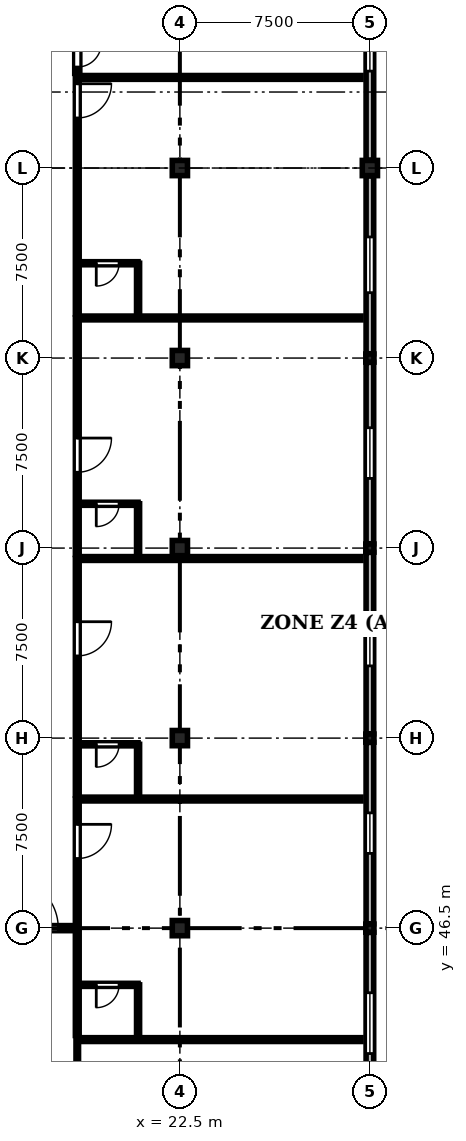
"""IFC4 building model, lengths in metres.
Left out: names, types, materials, properties, quantities, classifications, styles, units other than length and angle.
Written with IfcOpenShell. Run it as: python <this file> out.ifc"""

import sys

from ifc_helpers import new_model, si_unit, direction, frame, frame_2d, origin, origin_2d, place, context, subcontext, project, spatial, rectangle, circle, extrude, element, fill, save


model = new_model("IFC4")
c1 = context("Model", 3, precision=1e-05, world=origin(), true_north=direction((0.0, 1.0)))
c2 = subcontext(c1, "Body", "Model", "MODEL_VIEW")
j1 = project(units=[si_unit("LENGTHUNIT", "METRE"), si_unit("PLANEANGLEUNIT", "RADIAN")], contexts=[c1])
p1 = place(None, origin())
s1 = spatial("IfcSite", under=j1, at=p1, CompositionType="ELEMENT")
p2 = place(p1, origin())
s2 = spatial("IfcBuilding", under=s1, at=p2, CompositionType="ELEMENT")
p3 = place(p2, frame((0.0, 0.0, 21.9)))
s3 = spatial("IfcBuildingStorey", under=s2, at=p3, CompositionType="ELEMENT", Elevation=21.9)
p4 = place(p3, frame((22.5, 46.5, 0.0), z_axis=(0.0, 0.0, 1.0), x_axis=(1.0, 0.0, 0.0)))
e1 = element("IfcColumn", 1, at=p4, inside=s3, PredefinedType="COLUMN", context=c2, shape_type="SweptSolid", body=[
    extrude(circle(Radius=0.3, at=origin_2d()), origin(), (0.0, 0.0, 1.0), 4.05),
])
for number, where, z_axis, x_axis in (
    (2, (22.5, 54.0, 0.0), (0.0, 0.0, 1.0), (1.0, 0.0, 0.0)),
    (3, (22.5, 61.5, 0.0), (0.0, 0.0, 1.0), (1.0, 0.0, 0.0)),
):
    element("IfcColumn", number, at=place(p3, frame(where, z_axis=z_axis, x_axis=x_axis)), inside=s3, PredefinedType="COLUMN", context=c2, shape_type="SweptSolid", body=[
        extrude(rectangle(XDim=0.6, YDim=0.6, at=origin_2d()), origin(), (0.0, 0.0, 1.0), 4.05),
    ])
p5 = place(p3, frame((22.5, 69.0, 0.0), z_axis=(0.0, 0.0, 1.0), x_axis=(1.0, 0.0, 0.0)))
e4 = element("IfcColumn", 4, at=p5, inside=s3, PredefinedType="COLUMN", context=c2, shape_type="SweptSolid", body=[
    extrude(circle(Radius=0.3, at=origin_2d()), origin(), (0.0, 0.0, 1.0), 4.05),
])
p6 = place(p3, frame((22.5, 76.5, 0.0), z_axis=(0.0, 0.0, 1.0), x_axis=(1.0, 0.0, 0.0)))
e5 = element("IfcColumn", 5, at=p6, inside=s3, PredefinedType="COLUMN", context=c2, shape_type="SweptSolid", body=[
    extrude(rectangle(XDim=0.6, YDim=0.6, at=origin_2d()), origin(), (0.0, 0.0, 1.0), 4.05),
])
for number, where, z_axis, x_axis in (
    (6, (30.0, 46.5, 0.0), (0.0, 0.0, 1.0), (1.0, 0.0, 0.0)),
    (7, (30.0, 54.0, 0.0), (0.0, 0.0, 1.0), (1.0, 0.0, 0.0)),
    (8, (30.0, 61.5, 0.0), (0.0, 0.0, 1.0), (1.0, 0.0, 0.0)),
    (9, (30.0, 69.0, 0.0), (0.0, 0.0, 1.0), (1.0, 0.0, 0.0)),
):
    element("IfcColumn", number, at=place(p3, frame(where, z_axis=z_axis, x_axis=x_axis)), inside=s3, PredefinedType="COLUMN", context=c2, shape_type="SweptSolid", body=[
        extrude(rectangle(XDim=0.32, YDim=0.32, at=origin_2d()), origin(), (0.0, 0.0, 1.0), 4.05),
    ])
p7 = place(p3, frame((30.0, 76.5, 0.0), z_axis=(0.0, 0.0, 1.0), x_axis=(1.0, 0.0, 0.0)))
e10 = element("IfcColumn", 10, at=p7, inside=s3, PredefinedType="COLUMN", context=c2, shape_type="SweptSolid", body=[
    extrude(rectangle(XDim=0.6, YDim=0.6, at=origin_2d()), origin(), (0.0, 0.0, 1.0), 4.05),
])
p8 = place(p3, frame((30.0, 46.33, 0.0), z_axis=(0.0, 0.0, 1.0), x_axis=(0.0, -1.0, 0.0)))
e11 = element("IfcWall", 11, at=p8, inside=s3, PredefinedType="STANDARD", context=c2, shape_type="SweptSolid", body=[
    extrude(rectangle(XDim=7.16, YDim=0.3, at=frame_2d((3.58, 0.0))), origin(), (0.0, 0.0, 1.0), 3.17),
])
p9 = place(p8, frame((2.38, 0.0, 0.9)))
e12 = element("IfcOpeningElement", 12, at=p9, cuts=e11, PredefinedType="OPENING", context=c2, shape_type="SweptSolid", body=[
    extrude(rectangle(XDim=2.4, YDim=1.99, at=frame_2d((1.2, 0.995))), frame((0.0, 0.16, 0.0), z_axis=(0.0, -1.0, 0.0), x_axis=(1.0, 0.0, 0.0)), (0.0, 0.0, 1.0), 0.32),
])
p10 = place(p3, frame((30.0, 53.83, 0.0), z_axis=(0.0, 0.0, 1.0), x_axis=(0.0, -1.0, 0.0)))
e13 = element("IfcWall", 13, at=p10, inside=s3, PredefinedType="STANDARD", context=c2, shape_type="SweptSolid", body=[
    extrude(rectangle(XDim=7.16, YDim=0.3, at=frame_2d((3.58, 0.0))), origin(), (0.0, 0.0, 1.0), 3.17),
])
p11 = place(p10, frame((2.78, 0.0, 0.9)))
e14 = element("IfcOpeningElement", 14, at=p11, cuts=e13, PredefinedType="OPENING", context=c2, shape_type="SweptSolid", body=[
    extrude(rectangle(XDim=1.6, YDim=1.95, at=frame_2d((0.8, 0.975))), frame((0.0, 0.16, 0.0), z_axis=(0.0, -1.0, 0.0), x_axis=(1.0, 0.0, 0.0)), (0.0, 0.0, 1.0), 0.32),
])
p12 = place(p3, frame((30.0, 61.33, 0.0), z_axis=(0.0, 0.0, 1.0), x_axis=(0.0, -1.0, 0.0)))
e15 = element("IfcWall", 15, at=p12, inside=s3, PredefinedType="STANDARD", context=c2, shape_type="SweptSolid", body=[
    extrude(rectangle(XDim=7.16, YDim=0.3, at=frame_2d((3.58, 0.0))), origin(), (0.0, 0.0, 1.0), 3.17),
])
p13 = place(p12, frame((2.68, 0.0, 0.9)))
e16 = element("IfcOpeningElement", 16, at=p13, cuts=e15, PredefinedType="OPENING", context=c2, shape_type="SweptSolid", body=[
    extrude(rectangle(XDim=1.8, YDim=1.95, at=frame_2d((0.9, 0.975))), frame((0.0, 0.16, 0.0), z_axis=(0.0, -1.0, 0.0), x_axis=(1.0, 0.0, 0.0)), (0.0, 0.0, 1.0), 0.32),
])
p14 = place(p3, frame((30.0, 68.83, 0.0), z_axis=(0.0, 0.0, 1.0), x_axis=(0.0, -1.0, 0.0)))
e17 = element("IfcWall", 17, at=p14, inside=s3, PredefinedType="STANDARD", context=c2, shape_type="SweptSolid", body=[
    extrude(rectangle(XDim=7.16, YDim=0.3, at=frame_2d((3.58, 0.0))), origin(), (0.0, 0.0, 1.0), 3.17),
])
p15 = place(p14, frame((2.58, 0.0, 0.9)))
e18 = element("IfcOpeningElement", 18, at=p15, cuts=e17, PredefinedType="OPENING", context=c2, shape_type="SweptSolid", body=[
    extrude(rectangle(XDim=2.0, YDim=1.95, at=frame_2d((1.0, 0.975))), frame((0.0, 0.16, 0.0), z_axis=(0.0, -1.0, 0.0), x_axis=(1.0, 0.0, 0.0)), (0.0, 0.0, 1.0), 0.32),
])
p16 = place(p3, frame((30.0, 76.19, 0.0), z_axis=(0.0, 0.0, 1.0), x_axis=(0.0, -1.0, 0.0)))
e19 = element("IfcWall", 19, at=p16, inside=s3, PredefinedType="STANDARD", context=c2, shape_type="SweptSolid", body=[
    extrude(rectangle(XDim=7.02, YDim=0.3, at=frame_2d((3.51, 0.0))), origin(), (0.0, 0.0, 1.0), 3.17),
])
p17 = place(p16, frame((2.41, 0.0, 0.9)))
e20 = element("IfcOpeningElement", 20, at=p17, cuts=e19, PredefinedType="OPENING", context=c2, shape_type="SweptSolid", body=[
    extrude(rectangle(XDim=2.2, YDim=1.95, at=frame_2d((1.1, 0.975))), frame((0.0, 0.16, 0.0), z_axis=(0.0, -1.0, 0.0), x_axis=(1.0, 0.0, 0.0)), (0.0, 0.0, 1.0), 0.32),
])
p18 = place(p3, frame((30.0, 85.24, 0.0), z_axis=(0.0, 0.0, 1.0), x_axis=(0.0, -1.0, 0.0)))
e21 = element("IfcWall", 21, at=p18, inside=s3, PredefinedType="STANDARD", context=c2, shape_type="SweptSolid", body=[
    extrude(rectangle(XDim=8.43, YDim=0.3, at=frame_2d((4.215, 0.0))), origin(), (0.0, 0.0, 1.0), 3.22),
])
p19 = place(p18, frame((3.515, 0.0, 0.9)))
e22 = element("IfcOpeningElement", 22, at=p19, cuts=e21, PredefinedType="OPENING", context=c2, shape_type="SweptSolid", body=[
    extrude(rectangle(XDim=1.4, YDim=1.8, at=frame_2d((0.7, 0.9))), frame((0.0, 0.16, 0.0), z_axis=(0.0, -1.0, 0.0), x_axis=(1.0, 0.0, 0.0)), (0.0, 0.0, 1.0), 0.32),
])
p20 = place(p3, frame((18.45, 42.101, 0.0), z_axis=(0.0, 0.0, 1.0), x_axis=(0.0, -1.0, 0.0)))
e23 = element("IfcWall", 23, at=p20, inside=s3, PredefinedType="PARTITIONING", context=c2, shape_type="SweptSolid", body=[
    extrude(rectangle(XDim=9.334, YDim=0.1, at=frame_2d((4.667, 0.0))), origin(), (0.0, 0.0, 1.0), 3.755),
])
p21 = place(p20, frame((6.477, 0.0, 0.0)))
e24 = element("IfcOpeningElement", 24, at=p21, cuts=e23, PredefinedType="OPENING", context=c2, shape_type="SweptSolid", body=[
    extrude(rectangle(XDim=1.05, YDim=2.2, at=frame_2d((0.525, 1.1))), frame((0.0, 0.06, 0.0), z_axis=(0.0, -1.0, 0.0), x_axis=(1.0, 0.0, 0.0)), (0.0, 0.0, 1.0), 0.12),
])
p22 = place(p3, frame((18.45, 51.595, 0.0), z_axis=(0.0, 0.0, 1.0), x_axis=(0.0, -1.0, 0.0)))
e25 = element("IfcWall", 25, at=p22, inside=s3, PredefinedType="PARTITIONING", context=c2, shape_type="SweptSolid", body=[
    extrude(rectangle(XDim=9.334, YDim=0.15, at=frame_2d((4.667, 0.0))), origin(), (0.0, 0.0, 1.0), 3.755),
])
p23 = place(p22, frame((0.998, 0.0, 0.0)))
e26 = element("IfcOpeningElement", 26, at=p23, cuts=e25, PredefinedType="OPENING", context=c2, shape_type="SweptSolid", body=[
    extrude(rectangle(XDim=1.35, YDim=2.25, at=frame_2d((0.675, 1.125))), frame((0.0, 0.085, 0.0), z_axis=(0.0, -1.0, 0.0), x_axis=(1.0, 0.0, 0.0)), (0.0, 0.0, 1.0), 0.17),
])
p24 = place(p3, frame((20.85, 44.261, 0.0), z_axis=(0.0, 0.0, 1.0), x_axis=(-1.0, 0.0, 0.0)))
e27 = element("IfcWall", 27, at=p24, inside=s3, PredefinedType="PARTITIONING", context=c2, shape_type="SweptSolid", body=[
    extrude(rectangle(XDim=2.4, YDim=0.12, at=frame_2d((1.2, 0.0))), origin(), (0.0, 0.0, 1.0), 3.755),
])
p25 = place(p24, frame((0.75, 0.0, 0.0)))
e28 = element("IfcOpeningElement", 28, at=p25, cuts=e27, PredefinedType="OPENING", context=c2, shape_type="SweptSolid", body=[
    extrude(rectangle(XDim=0.9, YDim=2.1, at=frame_2d((0.45, 1.05))), frame((0.0, 0.07, 0.0), z_axis=(0.0, -1.0, 0.0), x_axis=(1.0, 0.0, 0.0)), (0.0, 0.0, 1.0), 0.14),
])
p26 = place(p3, frame((20.85, 42.261, 0.0), z_axis=(0.0, 0.0, 1.0), x_axis=(0.0, 1.0, 0.0)))
e29 = element("IfcWall", 29, at=p26, inside=s3, PredefinedType="PARTITIONING", context=c2, shape_type="SweptSolid", body=[
    extrude(rectangle(XDim=2.0, YDim=0.12, at=frame_2d((1.0, 0.0))), origin(), (0.0, 0.0, 1.0), 3.755),
])
p27 = place(p3, frame((18.45, 61.089, 0.0), z_axis=(0.0, 0.0, 1.0), x_axis=(0.0, -1.0, 0.0)))
e30 = element("IfcWall", 30, at=p27, inside=s3, PredefinedType="PARTITIONING", context=c2, shape_type="SweptSolid", body=[
    extrude(rectangle(XDim=9.334, YDim=0.15, at=frame_2d((4.667, 0.0))), origin(), (0.0, 0.0, 1.0), 3.755),
])
p28 = place(p27, frame((2.495, 0.0, 0.0)))
e31 = element("IfcOpeningElement", 31, at=p28, cuts=e30, PredefinedType="OPENING", context=c2, shape_type="SweptSolid", body=[
    extrude(rectangle(XDim=1.35, YDim=2.25, at=frame_2d((0.675, 1.125))), frame((0.0, 0.085, 0.0), z_axis=(0.0, -1.0, 0.0), x_axis=(1.0, 0.0, 0.0)), (0.0, 0.0, 1.0), 0.17),
])
p29 = place(p3, frame((20.85, 53.755, 0.0), z_axis=(0.0, 0.0, 1.0), x_axis=(-1.0, 0.0, 0.0)))
e32 = element("IfcWall", 32, at=p29, inside=s3, PredefinedType="PARTITIONING", context=c2, shape_type="SweptSolid", body=[
    extrude(rectangle(XDim=2.4, YDim=0.12, at=frame_2d((1.2, 0.0))), origin(), (0.0, 0.0, 1.0), 3.205),
])
p30 = place(p29, frame((0.75, 0.0, 0.0)))
e33 = element("IfcOpeningElement", 33, at=p30, cuts=e32, PredefinedType="OPENING", context=c2, shape_type="SweptSolid", body=[
    extrude(rectangle(XDim=0.9, YDim=2.1, at=frame_2d((0.45, 1.05))), frame((0.0, 0.07, 0.0), z_axis=(0.0, -1.0, 0.0), x_axis=(1.0, 0.0, 0.0)), (0.0, 0.0, 1.0), 0.14),
])
p31 = place(p3, frame((20.85, 51.755, 0.0), z_axis=(0.0, 0.0, 1.0), x_axis=(0.0, 1.0, 0.0)))
e34 = element("IfcWall", 34, at=p31, inside=s3, PredefinedType="PARTITIONING", context=c2, shape_type="SweptSolid", body=[
    extrude(rectangle(XDim=2.0, YDim=0.12, at=frame_2d((1.0, 0.0))), origin(), (0.0, 0.0, 1.0), 3.755),
])
p32 = place(p3, frame((18.45, 70.583, 0.0), z_axis=(0.0, 0.0, 1.0), x_axis=(0.0, -1.0, 0.0)))
e35 = element("IfcWall", 35, at=p32, inside=s3, PredefinedType="PARTITIONING", context=c2, shape_type="SweptSolid", body=[
    extrude(rectangle(XDim=9.334, YDim=0.15, at=frame_2d((4.667, 0.0))), origin(), (0.0, 0.0, 1.0), 3.755),
])
p33 = place(p32, frame((4.74, 0.0, 0.0)))
e36 = element("IfcOpeningElement", 36, at=p33, cuts=e35, PredefinedType="OPENING", context=c2, shape_type="SweptSolid", body=[
    extrude(rectangle(XDim=1.35, YDim=2.25, at=frame_2d((0.675, 1.125))), frame((0.0, 0.085, 0.0), z_axis=(0.0, -1.0, 0.0), x_axis=(1.0, 0.0, 0.0)), (0.0, 0.0, 1.0), 0.17),
])
p34 = place(p3, frame((20.85, 63.249, 0.0), z_axis=(0.0, 0.0, 1.0), x_axis=(-1.0, 0.0, 0.0)))
e37 = element("IfcWall", 37, at=p34, inside=s3, PredefinedType="PARTITIONING", context=c2, shape_type="SweptSolid", body=[
    extrude(rectangle(XDim=2.4, YDim=0.12, at=frame_2d((1.2, 0.0))), origin(), (0.0, 0.0, 1.0), 3.755),
])
p35 = place(p34, frame((0.75, 0.0, 0.0)))
e38 = element("IfcOpeningElement", 38, at=p35, cuts=e37, PredefinedType="OPENING", context=c2, shape_type="SweptSolid", body=[
    extrude(rectangle(XDim=0.9, YDim=2.1, at=frame_2d((0.45, 1.05))), frame((0.0, 0.07, 0.0), z_axis=(0.0, -1.0, 0.0), x_axis=(1.0, 0.0, 0.0)), (0.0, 0.0, 1.0), 0.14),
])
p36 = place(p3, frame((20.85, 61.249, 0.0), z_axis=(0.0, 0.0, 1.0), x_axis=(0.0, 1.0, 0.0)))
e39 = element("IfcWall", 39, at=p36, inside=s3, PredefinedType="PARTITIONING", context=c2, shape_type="SweptSolid", body=[
    extrude(rectangle(XDim=2.0, YDim=0.12, at=frame_2d((1.0, 0.0))), origin(), (0.0, 0.0, 1.0), 3.755),
])
p37 = place(p3, frame((18.45, 80.076, 0.0), z_axis=(0.0, 0.0, 1.0), x_axis=(0.0, -1.0, 0.0)))
e40 = element("IfcWall", 40, at=p37, inside=s3, PredefinedType="PARTITIONING", context=c2, shape_type="SweptSolid", body=[
    extrude(rectangle(XDim=9.334, YDim=0.15, at=frame_2d((4.667, 0.0))), origin(), (0.0, 0.0, 1.0), 3.355),
])
p38 = place(p37, frame((0.25, 0.0, 0.0)))
e41 = element("IfcOpeningElement", 41, at=p38, cuts=e40, PredefinedType="OPENING", context=c2, shape_type="SweptSolid", body=[
    extrude(rectangle(XDim=1.35, YDim=2.25, at=frame_2d((0.675, 1.125))), frame((0.0, 0.085, 0.0), z_axis=(0.0, -1.0, 0.0), x_axis=(1.0, 0.0, 0.0)), (0.0, 0.0, 1.0), 0.17),
])
p39 = place(p3, frame((20.85, 72.742, 0.0), z_axis=(0.0, 0.0, 1.0), x_axis=(-1.0, 0.0, 0.0)))
e42 = element("IfcWall", 42, at=p39, inside=s3, PredefinedType="PARTITIONING", context=c2, shape_type="SweptSolid", body=[
    extrude(rectangle(XDim=2.4, YDim=0.12, at=frame_2d((1.2, 0.0))), origin(), (0.0, 0.0, 1.0), 3.755),
])
p40 = place(p39, frame((0.75, 0.0, 0.0)))
e43 = element("IfcOpeningElement", 43, at=p40, cuts=e42, PredefinedType="OPENING", context=c2, shape_type="SweptSolid", body=[
    extrude(rectangle(XDim=0.9, YDim=2.1, at=frame_2d((0.45, 1.05))), frame((0.0, 0.07, 0.0), z_axis=(0.0, -1.0, 0.0), x_axis=(1.0, 0.0, 0.0)), (0.0, 0.0, 1.0), 0.14),
])
p41 = place(p3, frame((20.85, 70.742, 0.0), z_axis=(0.0, 0.0, 1.0), x_axis=(0.0, 1.0, 0.0)))
e44 = element("IfcWall", 44, at=p41, inside=s3, PredefinedType="PARTITIONING", context=c2, shape_type="SweptSolid", body=[
    extrude(rectangle(XDim=2.0, YDim=0.12, at=frame_2d((1.0, 0.0))), origin(), (0.0, 0.0, 1.0), 3.755),
])
p42 = place(p3, frame((18.45, 89.57, 0.0), z_axis=(0.0, 0.0, 1.0), x_axis=(0.0, -1.0, 0.0)))
e45 = element("IfcWall", 45, at=p42, inside=s3, PredefinedType="STANDARD", context=c2, shape_type="SweptSolid", body=[
    extrude(rectangle(XDim=9.334, YDim=0.2, at=frame_2d((4.667, 0.0))), origin(), (0.0, 0.0, 1.0), 3.355),
])
p43 = place(p42, frame((8.134, 0.0, 0.0)))
e46 = element("IfcOpeningElement", 46, at=p43, cuts=e45, PredefinedType="OPENING", context=c2, shape_type="SweptSolid", body=[
    extrude(rectangle(XDim=0.95, YDim=2.15, at=frame_2d((0.475, 1.075))), frame((0.0, 0.11, 0.0), z_axis=(0.0, -1.0, 0.0), x_axis=(1.0, 0.0, 0.0)), (0.0, 0.0, 1.0), 0.22),
])
for number, where, z_axis, x_axis in (
    (47, (18.45, 42.101, 0.0), (0.0, 0.0, 1.0), (1.0, 0.0, 0.0)),
    (48, (18.45, 51.595, 0.0), (0.0, 0.0, 1.0), (1.0, 0.0, 0.0)),
    (49, (18.45, 61.089, 0.0), (0.0, 0.0, 1.0), (1.0, 0.0, 0.0)),
    (50, (18.45, 70.583, 0.0), (0.0, 0.0, 1.0), (1.0, 0.0, 0.0)),
    (51, (18.45, 80.076, 0.0), (0.0, 0.0, 1.0), (1.0, 0.0, 0.0)),
):
    element("IfcWall", number, at=place(p3, frame(where, z_axis=z_axis, x_axis=x_axis)), inside=s3, PredefinedType="PARTITIONING", context=c2, shape_type="SweptSolid", body=[
        extrude(rectangle(XDim=11.2, YDim=0.15, at=frame_2d((5.6, 0.0))), origin(), (0.0, 0.0, 1.0), 3.755),
    ])
p44 = place(p3, frame((15.2, 46.5, 0.0), z_axis=(0.0, 0.0, 1.0), x_axis=(1.0, 0.0, 0.0)))
e52 = element("IfcWall", 52, at=p44, inside=s3, PredefinedType="STANDARD", context=c2, shape_type="SweptSolid", body=[
    extrude(rectangle(XDim=3.0, YDim=0.2, at=frame_2d((1.5, 0.0))), origin(), (0.0, 0.0, 1.0), 3.155),
])
p45 = place(p44, frame((0.5, 0.0, 0.0)))
e53 = element("IfcOpeningElement", 53, at=p45, cuts=e52, PredefinedType="OPENING", context=c2, shape_type="SweptSolid", body=[
    extrude(rectangle(XDim=2.0, YDim=2.3, at=frame_2d((1.0, 1.15))), frame((0.0, 0.11, 0.0), z_axis=(0.0, -1.0, 0.0), x_axis=(1.0, 0.0, 0.0)), (0.0, 0.0, 1.0), 0.22),
])
p46 = place(p9, origin())
e54 = element("IfcWindow", 54, at=p46, inside=s3, PartitioningType="SINGLE_PANEL", PredefinedType="WINDOW", context=c2, shape_type="SweptSolid", body=[
    extrude(rectangle(XDim=2.4, YDim=1.99, at=frame_2d((1.2, 0.995))), frame((0.0, 0.03, 0.0), z_axis=(0.0, -1.0, 0.0), x_axis=(1.0, 0.0, 0.0)), (0.0, 0.0, 1.0), 0.06),
])
fill(e12, e54)
p47 = place(p11, origin())
e55 = element("IfcWindow", 55, at=p47, inside=s3, PartitioningType="SINGLE_PANEL", PredefinedType="WINDOW", context=c2, shape_type="SweptSolid", body=[
    extrude(rectangle(XDim=1.6, YDim=1.95, at=frame_2d((0.8, 0.975))), frame((0.0, 0.03, 0.0), z_axis=(0.0, -1.0, 0.0), x_axis=(1.0, 0.0, 0.0)), (0.0, 0.0, 1.0), 0.06),
])
fill(e14, e55)
p48 = place(p13, origin())
e56 = element("IfcWindow", 56, at=p48, inside=s3, PartitioningType="SINGLE_PANEL", PredefinedType="WINDOW", context=c2, shape_type="SweptSolid", body=[
    extrude(rectangle(XDim=1.8, YDim=1.95, at=frame_2d((0.9, 0.975))), frame((0.0, 0.03, 0.0), z_axis=(0.0, -1.0, 0.0), x_axis=(1.0, 0.0, 0.0)), (0.0, 0.0, 1.0), 0.06),
])
fill(e16, e56)
p49 = place(p15, origin())
e57 = element("IfcWindow", 57, at=p49, inside=s3, PartitioningType="SINGLE_PANEL", PredefinedType="WINDOW", context=c2, shape_type="SweptSolid", body=[
    extrude(rectangle(XDim=2.0, YDim=1.95, at=frame_2d((1.0, 0.975))), frame((0.0, 0.03, 0.0), z_axis=(0.0, -1.0, 0.0), x_axis=(1.0, 0.0, 0.0)), (0.0, 0.0, 1.0), 0.06),
])
fill(e18, e57)
p50 = place(p17, origin())
e58 = element("IfcWindow", 58, at=p50, inside=s3, PartitioningType="SINGLE_PANEL", PredefinedType="WINDOW", context=c2, shape_type="SweptSolid", body=[
    extrude(rectangle(XDim=2.2, YDim=1.95, at=frame_2d((1.1, 0.975))), frame((0.0, 0.03, 0.0), z_axis=(0.0, -1.0, 0.0), x_axis=(1.0, 0.0, 0.0)), (0.0, 0.0, 1.0), 0.06),
])
fill(e20, e58)
p51 = place(p19, origin())
e59 = element("IfcWindow", 59, at=p51, inside=s3, PartitioningType="SINGLE_PANEL", PredefinedType="WINDOW", context=c2, shape_type="SweptSolid", body=[
    extrude(rectangle(XDim=1.4, YDim=1.8, at=frame_2d((0.7, 0.9))), frame((0.0, 0.03, 0.0), z_axis=(0.0, -1.0, 0.0), x_axis=(1.0, 0.0, 0.0)), (0.0, 0.0, 1.0), 0.06),
])
fill(e22, e59)
p52 = place(p23, origin())
e60 = element("IfcDoor", 60, at=p52, inside=s3, OperationType="SINGLE_SWING_LEFT", PredefinedType="DOOR", context=c2, shape_type="SweptSolid", body=[
    extrude(rectangle(XDim=1.35, YDim=2.25, at=frame_2d((0.675, 1.125))), frame((0.0, 0.025, 0.0), z_axis=(0.0, -1.0, 0.0), x_axis=(1.0, 0.0, 0.0)), (0.0, 0.0, 1.0), 0.05),
])
fill(e26, e60)
p53 = place(p25, origin())
e61 = element("IfcDoor", 61, at=p53, inside=s3, OperationType="SINGLE_SWING_RIGHT", PredefinedType="DOOR", context=c2, shape_type="SweptSolid", body=[
    extrude(rectangle(XDim=0.9, YDim=2.1, at=frame_2d((0.45, 1.05))), frame((0.0, 0.025, 0.0), z_axis=(0.0, -1.0, 0.0), x_axis=(1.0, 0.0, 0.0)), (0.0, 0.0, 1.0), 0.05),
])
fill(e28, e61)
p54 = place(p28, origin())
e62 = element("IfcDoor", 62, at=p54, inside=s3, OperationType="SINGLE_SWING_LEFT", PredefinedType="DOOR", context=c2, shape_type="SweptSolid", body=[
    extrude(rectangle(XDim=1.35, YDim=2.25, at=frame_2d((0.675, 1.125))), frame((0.0, 0.025, 0.0), z_axis=(0.0, -1.0, 0.0), x_axis=(1.0, 0.0, 0.0)), (0.0, 0.0, 1.0), 0.05),
])
fill(e31, e62)
p55 = place(p30, origin())
e63 = element("IfcDoor", 63, at=p55, inside=s3, OperationType="SINGLE_SWING_RIGHT", PredefinedType="DOOR", context=c2, shape_type="SweptSolid", body=[
    extrude(rectangle(XDim=0.9, YDim=2.1, at=frame_2d((0.45, 1.05))), frame((0.0, 0.025, 0.0), z_axis=(0.0, -1.0, 0.0), x_axis=(1.0, 0.0, 0.0)), (0.0, 0.0, 1.0), 0.05),
])
fill(e33, e63)
p56 = place(p33, origin())
e64 = element("IfcDoor", 64, at=p56, inside=s3, OperationType="SINGLE_SWING_LEFT", PredefinedType="DOOR", context=c2, shape_type="SweptSolid", body=[
    extrude(rectangle(XDim=1.35, YDim=2.25, at=frame_2d((0.675, 1.125))), frame((0.0, 0.025, 0.0), z_axis=(0.0, -1.0, 0.0), x_axis=(1.0, 0.0, 0.0)), (0.0, 0.0, 1.0), 0.05),
])
fill(e36, e64)
p57 = place(p35, origin())
e65 = element("IfcDoor", 65, at=p57, inside=s3, OperationType="SINGLE_SWING_RIGHT", PredefinedType="DOOR", context=c2, shape_type="SweptSolid", body=[
    extrude(rectangle(XDim=0.9, YDim=2.1, at=frame_2d((0.45, 1.05))), frame((0.0, 0.025, 0.0), z_axis=(0.0, -1.0, 0.0), x_axis=(1.0, 0.0, 0.0)), (0.0, 0.0, 1.0), 0.05),
])
fill(e38, e65)
p58 = place(p38, origin())
e66 = element("IfcDoor", 66, at=p58, inside=s3, OperationType="SINGLE_SWING_LEFT", PredefinedType="DOOR", context=c2, shape_type="SweptSolid", body=[
    extrude(rectangle(XDim=1.35, YDim=2.25, at=frame_2d((0.675, 1.125))), frame((0.0, 0.025, 0.0), z_axis=(0.0, -1.0, 0.0), x_axis=(1.0, 0.0, 0.0)), (0.0, 0.0, 1.0), 0.05),
])
fill(e41, e66)
p59 = place(p40, origin())
e67 = element("IfcDoor", 67, at=p59, inside=s3, OperationType="SINGLE_SWING_RIGHT", PredefinedType="DOOR", context=c2, shape_type="SweptSolid", body=[
    extrude(rectangle(XDim=0.9, YDim=2.1, at=frame_2d((0.45, 1.05))), frame((0.0, 0.025, 0.0), z_axis=(0.0, -1.0, 0.0), x_axis=(1.0, 0.0, 0.0)), (0.0, 0.0, 1.0), 0.05),
])
fill(e43, e67)
p60 = place(p43, origin())
e68 = element("IfcDoor", 68, at=p60, inside=s3, OperationType="SINGLE_SWING_LEFT", PredefinedType="DOOR", context=c2, shape_type="SweptSolid", body=[
    extrude(rectangle(XDim=0.95, YDim=2.15, at=frame_2d((0.475, 1.075))), frame((0.0, 0.025, 0.0), z_axis=(0.0, -1.0, 0.0), x_axis=(1.0, 0.0, 0.0)), (0.0, 0.0, 1.0), 0.05),
])
fill(e46, e68)
p61 = place(p45, origin())
e69 = element("IfcDoor", 69, at=p61, inside=s3, OperationType="DOUBLE_DOOR_SINGLE_SWING", PredefinedType="DOOR", context=c2, shape_type="SweptSolid", body=[
    extrude(rectangle(XDim=2.0, YDim=2.3, at=frame_2d((1.0, 1.15))), frame((0.0, 0.025, 0.0), z_axis=(0.0, -1.0, 0.0), x_axis=(1.0, 0.0, 0.0)), (0.0, 0.0, 1.0), 0.05),
])
fill(e53, e69)
save(model, sys.argv[1])
